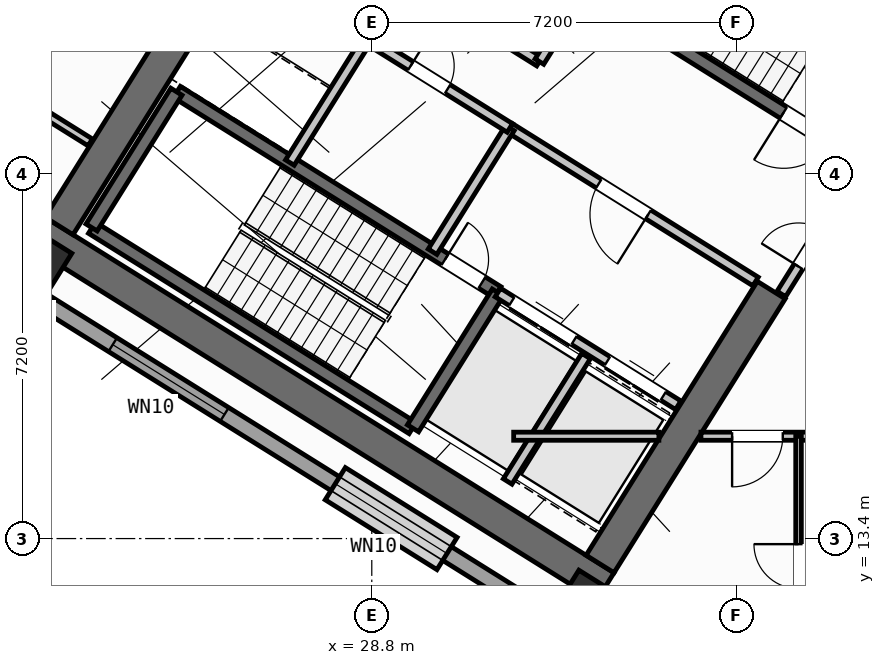
"""IFC4 building model, lengths in metres.
Left out: names, types, materials, properties, quantities, classifications, styles, units other than length and angle.
Written with IfcOpenShell. Run it as: python <this file> out.ifc"""

import sys

from ifc_helpers import new_model, si_unit, direction, frame, frame_2d, origin, origin_2d, place, context, subcontext, project, spatial, rectangle, hollow_rectangle, extrude, source, transform, mapped, element, fill, save


model = new_model("IFC4")
c1 = context("Model", 3, precision=1e-05, world=origin(), true_north=direction((0.0, 1.0)))
c2 = subcontext(c1, "Body", "Model", "MODEL_VIEW")
j1 = project(units=[si_unit("LENGTHUNIT", "METRE"), si_unit("PLANEANGLEUNIT", "RADIAN")], contexts=[c1])
p1 = place(None, origin())
s1 = spatial("IfcSite", under=j1, at=p1, CompositionType="ELEMENT")
p2 = place(p1, origin())
s2 = spatial("IfcBuilding", under=s1, at=p2, CompositionType="ELEMENT")
p3 = place(p2, frame((0.0, 0.0, 76.5)))
s3 = spatial("IfcBuildingStorey", under=s2, at=p3, CompositionType="ELEMENT", Elevation=76.5)
p4 = place(p3, frame((33.409, 12.45, 0.0), z_axis=(0.0, 0.0, 1.0), x_axis=(-0.848051132073, 0.529914405721, 0.0)))
e1 = element("IfcWall", 1, at=p4, inside=s3, PredefinedType="SHEAR", context=c2, shape_type="SweptSolid", body=[
    extrude(rectangle(XDim=13.24, YDim=0.65, at=frame_2d((6.62, 0.0))), origin(), (0.0, 0.0, 1.0), 4.25),
])
p5 = place(p3, frame((36.683, 18.304, 0.0), z_axis=(0.0, 0.0, 1.0), x_axis=(-0.529899109053, -0.848060690178, 0.0)))
e2 = element("IfcWall", 2, at=p5, inside=s3, PredefinedType="SHEAR", context=c2, shape_type="SweptSolid", body=[
    extrude(rectangle(XDim=6.375, YDim=0.65, at=frame_2d((3.188, 0.0))), origin(), (0.0, 0.0, 1.0), 4.25),
])
p6 = place(p3, frame((26.007, 24.976, 0.0), z_axis=(0.0, 0.0, 1.0), x_axis=(-0.529916319127, -0.848049936456, 0.0)))
e3 = element("IfcWall", 3, at=p6, inside=s3, PredefinedType="SHEAR", context=c2, shape_type="SweptSolid", body=[
    extrude(rectangle(XDim=6.375, YDim=0.65, at=frame_2d((3.188, 0.0))), origin(), (0.0, 0.0, 1.0), 4.25),
])
m1 = source(origin(), c2, "Body", "SweptSolid", [
    extrude(hollow_rectangle(XDim=1.0, YDim=1.0, WallThickness=0.04, at=origin_2d()), origin(), (0.0, 0.0, 1.0), 4.5),
])
for number, where, z_axis, x_axis in (
    (4, (33.046, 12.087, 0.0), (0.0, 0.0, 1.0), (-0.848, 0.53, 0.0)),
    (5, (22.191, 18.87, 0.0), (0.0, 0.0, 1.0), (-0.848, 0.53, 0.0)),
):
    element("IfcColumn", number, at=place(p3, frame(where, z_axis=z_axis, x_axis=x_axis)), inside=s3, PredefinedType="COLUMN", context=c2, shape_type="MappedRepresentation", body=[
        mapped(m1, transform((0.0, 0.0, 0.0), scale=1.0)),
    ])
p7 = place(p3, frame((31.76, 12.183, 0.0), z_axis=(0.0, 0.0, 1.0), x_axis=(-0.848047074256, 0.529920899612, 0.0)))
e6 = element("IfcWall", 6, at=p7, inside=s3, PredefinedType="STANDARD", context=c2, shape_type="SweptSolid", body=[
    extrude(rectangle(XDim=30.652, YDim=0.32, at=frame_2d((15.326, 0.0))), origin(), (0.0, 0.0, 1.0), 4.25),
])
p8 = place(p7, frame((14.878, 0.0, 0.0)))
e7 = element("IfcOpeningElement", 7, at=p8, cuts=e6, PredefinedType="OPENING", context=c2, shape_type="SweptSolid", body=[
    extrude(rectangle(XDim=1.2, YDim=2.15, at=frame_2d((0.6, 1.075))), frame((0.0, 0.17, 0.0), z_axis=(0.0, -1.0, 0.0), x_axis=(1.0, 0.0, 0.0)), (0.0, 0.0, 1.0), 0.34),
])
p9 = place(p7, frame((1.74, 0.0, 0.7)))
e8 = element("IfcOpeningElement", 8, at=p9, cuts=e6, PredefinedType="OPENING", context=c2, shape_type="SweptSolid", body=[
    extrude(rectangle(XDim=2.6, YDim=2.0, at=frame_2d((1.3, 1.0))), frame((0.0, 0.17, 0.0), z_axis=(0.0, -1.0, 0.0), x_axis=(1.0, 0.0, 0.0)), (0.0, 0.0, 1.0), 0.34),
])
p10 = place(p7, frame((6.919, 0.0, 0.7)))
e9 = element("IfcOpeningElement", 9, at=p10, cuts=e6, PredefinedType="OPENING", context=c2, shape_type="SweptSolid", body=[
    extrude(rectangle(XDim=2.6, YDim=2.0, at=frame_2d((1.3, 1.0))), frame((0.0, 0.17, 0.0), z_axis=(0.0, -1.0, 0.0), x_axis=(1.0, 0.0, 0.0)), (0.0, 0.0, 1.0), 0.34),
])
p11 = place(p7, frame((19.451, 0.0, 0.85)))
e10 = element("IfcOpeningElement", 10, at=p11, cuts=e6, PredefinedType="OPENING", context=c2, shape_type="SweptSolid", body=[
    extrude(rectangle(XDim=1.6, YDim=1.8, at=frame_2d((0.8, 0.9))), frame((0.0, 0.17, 0.0), z_axis=(0.0, -1.0, 0.0), x_axis=(1.0, 0.0, 0.0)), (0.0, 0.0, 1.0), 0.34),
])
p12 = place(p7, frame((26.358, 0.0, 0.7)))
e11 = element("IfcOpeningElement", 11, at=p12, cuts=e6, PredefinedType="OPENING", context=c2, shape_type="SweptSolid", body=[
    extrude(rectangle(XDim=2.6, YDim=2.0, at=frame_2d((1.3, 1.0))), frame((0.0, 0.17, 0.0), z_axis=(0.0, -1.0, 0.0), x_axis=(1.0, 0.0, 0.0)), (0.0, 0.0, 1.0), 0.34),
])
p13 = place(p3, frame((29.605, 15.581, 0.0), z_axis=(0.0, 0.0, 1.0), x_axis=(-0.848036911448, 0.529937163087, 0.0)))
e12 = element("IfcWall", 12, at=p13, inside=s3, PredefinedType="SHEAR", context=c2, shape_type="SweptSolid", body=[
    extrude(rectangle(XDim=7.46, YDim=0.26, at=frame_2d((3.73, 0.0))), origin(), (0.0, 0.0, 1.0), 4.25),
])
p14 = place(p3, frame((31.28, 18.261, 0.0), z_axis=(0.0, 0.0, 1.0), x_axis=(-0.848051618787, 0.529913626805, 0.0)))
e13 = element("IfcWall", 13, at=p14, inside=s3, PredefinedType="SHEAR", context=c2, shape_type="SweptSolid", body=[
    extrude(rectangle(XDim=7.46, YDim=0.26, at=frame_2d((3.73, 0.0))), origin(), (0.0, 0.0, 1.0), 4.25),
])
p15 = place(p14, frame((0.36, 0.0, 0.0)))
e14 = element("IfcOpeningElement", 14, at=p15, cuts=e13, PredefinedType="OPENING", context=c2, shape_type="SweptSolid", body=[
    extrude(rectangle(XDim=0.86, YDim=2.05, at=frame_2d((0.43, 1.025))), frame((0.0, 0.14, 0.0), z_axis=(0.0, -1.0, 0.0), x_axis=(1.0, 0.0, 0.0)), (0.0, 0.0, 1.0), 0.28),
])
p16 = place(p3, frame((31.288, 18.256, 0.0), z_axis=(0.0, 0.0, 1.0), x_axis=(-0.529943379326, -0.848033026897, 0.0)))
e15 = element("IfcWall", 15, at=p16, inside=s3, PredefinedType="SHEAR", context=c2, shape_type="SweptSolid", body=[
    extrude(rectangle(XDim=3.16, YDim=0.26, at=frame_2d((1.58, 0.0))), origin(), (0.0, 0.0, 1.0), 4.25),
])
p17 = place(p3, frame((24.945, 22.22, 0.0), z_axis=(0.0, 0.0, 1.0), x_axis=(-0.529908658664, -0.84805472316, 0.0)))
e16 = element("IfcWall", 16, at=p17, inside=s3, PredefinedType="SHEAR", context=c2, shape_type="SweptSolid", body=[
    extrude(rectangle(XDim=3.16, YDim=0.26, at=frame_2d((1.58, 0.0))), origin(), (0.0, 0.0, 1.0), 4.25),
])
p18 = place(p3, frame((38.046, 21.108, 0.0), z_axis=(0.0, 0.0, 1.0), x_axis=(-0.848054434086, 0.529909121291, 0.0)))
e17 = element("IfcWall", 17, at=p18, inside=s3, PredefinedType="SHEAR", context=c2, shape_type="SweptSolid", body=[
    extrude(rectangle(XDim=7.33, YDim=0.26, at=frame_2d((3.665, 0.0))), origin(), (0.0, 0.0, 1.0), 4.25),
])
p19 = place(p18, frame((0.22, 0.0, 0.0)))
e18 = element("IfcOpeningElement", 18, at=p19, cuts=e17, PredefinedType="OPENING", context=c2, shape_type="SweptSolid", body=[
    extrude(rectangle(XDim=1.1, YDim=2.1, at=frame_2d((0.55, 1.05))), frame((0.0, 0.14, 0.0), z_axis=(0.0, -1.0, 0.0), x_axis=(1.0, 0.0, 0.0)), (0.0, 0.0, 1.0), 0.28),
])
p20 = place(p3, frame((34.848, 16.031, 0.0), z_axis=(0.0, 0.0, 1.0), x_axis=(-0.848044042236, 0.529925751807, 0.0)))
e19 = element("IfcWall", 19, at=p20, inside=s3, PredefinedType="STANDARD", context=c2, shape_type="SweptSolid", body=[
    extrude(rectangle(XDim=4.198, YDim=0.2, at=frame_2d((2.099, 0.0))), origin(), (0.0, 0.0, 1.0), 4.24),
])
p21 = place(p20, frame((0.348, 0.0, 0.0)))
e20 = element("IfcOpeningElement", 20, at=p21, cuts=e19, PredefinedType="OPENING", context=c2, shape_type="SweptSolid", body=[
    extrude(rectangle(XDim=1.3, YDim=2.2, at=frame_2d((0.65, 1.1))), frame((0.0, 0.11, 0.0), z_axis=(0.0, -1.0, 0.0), x_axis=(1.0, 0.0, 0.0)), (0.0, 0.0, 1.0), 0.22),
])
p22 = place(p20, frame((2.423, 0.0, 0.0)))
e21 = element("IfcOpeningElement", 21, at=p22, cuts=e19, PredefinedType="OPENING", context=c2, shape_type="SweptSolid", body=[
    extrude(rectangle(XDim=1.45, YDim=2.25, at=frame_2d((0.725, 1.125))), frame((0.0, 0.11, 0.0), z_axis=(0.0, -1.0, 0.0), x_axis=(1.0, 0.0, 0.0)), (0.0, 0.0, 1.0), 0.22),
])
p23 = place(p3, frame((36.374, 18.474, 0.0), z_axis=(0.0, 0.0, 1.0), x_axis=(-0.848051071577, 0.529914502535, 0.0)))
e22 = element("IfcWall", 22, at=p23, inside=s3, PredefinedType="STANDARD", context=c2, shape_type="SweptSolid", body=[
    extrude(rectangle(XDim=5.718, YDim=0.2, at=frame_2d((2.859, 0.0))), origin(), (0.0, 0.0, 1.0), 4.24),
])
p24 = place(p23, frame((2.498, 0.0, 0.0)))
e23 = element("IfcOpeningElement", 23, at=p24, cuts=e22, PredefinedType="OPENING", context=c2, shape_type="SweptSolid", body=[
    extrude(rectangle(XDim=1.15, YDim=2.1, at=frame_2d((0.575, 1.05))), frame((0.0, 0.11, 0.0), z_axis=(0.0, -1.0, 0.0), x_axis=(1.0, 0.0, 0.0)), (0.0, 0.0, 1.0), 0.22),
])
p25 = place(p3, frame((32.108, 22.814, 0.0), z_axis=(0.0, 0.0, 1.0), x_axis=(-0.848042229521, 0.529928652696, 0.0)))
e24 = element("IfcWall", 24, at=p25, inside=s3, PredefinedType="STANDARD", context=c2, shape_type="SweptSolid", body=[
    extrude(rectangle(XDim=5.62, YDim=0.2, at=frame_2d((2.81, 0.0))), origin(), (0.0, 0.0, 1.0), 4.24),
])
p26 = place(p3, frame((32.982, 24.213, 0.0), z_axis=(0.0, 0.0, 1.0), x_axis=(-0.529839334948, -0.84809803628, 0.0)))
e25 = element("IfcWall", 25, at=p26, inside=s3, PredefinedType="STANDARD", context=c2, shape_type="SweptSolid", body=[
    extrude(rectangle(XDim=1.65, YDim=0.2, at=frame_2d((0.825, 0.0))), origin(), (0.0, 0.0, 1.0), 4.24),
])
p27 = place(p3, frame((33.029, 17.003, 0.0), z_axis=(0.0, 0.0, 1.0), x_axis=(-0.529916267533, -0.848049968695, 0.0)))
e26 = element("IfcWall", 26, at=p27, inside=s3, PredefinedType="STANDARD", context=c2, shape_type="SweptSolid", body=[
    extrude(rectangle(XDim=2.92, YDim=0.2, at=frame_2d((1.46, 0.0))), origin(), (0.0, 0.0, 1.0), 4.24),
])
for number, where, z_axis, x_axis in (
    (27, (31.525, 21.504, 0.0), (0.0, 0.0, 1.0), (-0.53, -0.848, 0.0)),
    (28, (28.71, 23.263, 0.0), (0.0, 0.0, 1.0), (-0.53, -0.848, 0.0)),
):
    element("IfcWall", number, at=place(p3, frame(where, z_axis=z_axis, x_axis=x_axis)), inside=s3, PredefinedType="STANDARD", context=c2, shape_type="SweptSolid", body=[
        extrude(rectangle(XDim=2.88, YDim=0.2, at=frame_2d((1.44, 0.0))), origin(), (0.0, 0.0, 1.0), 4.24),
    ])
p28 = place(p3, frame((31.525, 21.504, 0.0), z_axis=(0.0, 0.0, 1.0), x_axis=(-0.848044998614, 0.529924221305, 0.0)))
e29 = element("IfcWall", 29, at=p28, inside=s3, PredefinedType="STANDARD", context=c2, shape_type="SweptSolid", body=[
    extrude(rectangle(XDim=6.168, YDim=0.2, at=frame_2d((3.084, 0.0))), origin(), (0.0, 0.0, 1.0), 4.24),
])
p29 = place(p28, frame((4.4, 0.0, 0.0)))
e30 = element("IfcOpeningElement", 30, at=p29, cuts=e29, PredefinedType="OPENING", context=c2, shape_type="SweptSolid", body=[
    extrude(rectangle(XDim=0.86, YDim=2.05, at=frame_2d((0.43, 1.025))), frame((0.0, 0.11, 0.0), z_axis=(0.0, -1.0, 0.0), x_axis=(1.0, 0.0, 0.0)), (0.0, 0.0, 1.0), 0.22),
])
p30 = place(p28, frame((1.45, 0.0, 0.0)))
e31 = element("IfcOpeningElement", 31, at=p30, cuts=e29, PredefinedType="OPENING", context=c2, shape_type="SweptSolid", body=[
    extrude(rectangle(XDim=0.86, YDim=2.05, at=frame_2d((0.43, 1.025))), frame((0.0, 0.11, 0.0), z_axis=(0.0, -1.0, 0.0), x_axis=(1.0, 0.0, 0.0)), (0.0, 0.0, 1.0), 0.22),
])
p31 = place(p3, frame((23.244, 21.219, 0.0), z_axis=(0.0, 0.0, 1.0), x_axis=(-0.848040823168, 0.52993090327, 0.0)))
e32 = element("IfcWall", 32, at=p31, inside=s3, PredefinedType="PARTITIONING", context=c2, shape_type="SweptSolid", body=[
    extrude(rectangle(XDim=2.258, YDim=0.16, at=frame_2d((1.129, 0.0))), origin(), (0.0, 0.0, 1.0), 4.24),
])
p32 = place(p3, frame((38.451, 20.737, 0.0), z_axis=(0.0, 0.0, 1.0), x_axis=(-0.529924799939, -0.848044637038, 0.0)))
e33 = element("IfcWall", 33, at=p32, inside=s3, PredefinedType="STANDARD", context=c2, shape_type="SweptSolid", body=[
    extrude(rectangle(XDim=2.96, YDim=0.2, at=frame_2d((1.48, 0.0))), origin(), (0.0, 0.0, 1.0), 4.24),
])
p33 = place(p32, frame((1.46, 0.0, 0.0)))
e34 = element("IfcOpeningElement", 34, at=p33, cuts=e33, PredefinedType="OPENING", context=c2, shape_type="SweptSolid", body=[
    extrude(rectangle(XDim=0.86, YDim=2.05, at=frame_2d((0.43, 1.025))), frame((0.0, 0.11, 0.0), z_axis=(0.0, -1.0, 0.0), x_axis=(1.0, 0.0, 0.0)), (0.0, 0.0, 1.0), 0.22),
])
p34 = place(p3, frame((31.6, 15.42, 0.0), z_axis=(0.0, 0.0, 1.0), x_axis=(1.0, 0.0, 0.0)))
e35 = element("IfcWall", 35, at=p34, inside=s3, PredefinedType="PARTITIONING", context=c2, shape_type="SweptSolid", body=[
    extrude(rectangle(XDim=2.866, YDim=0.16, at=frame_2d((1.433, 0.0))), origin(), (0.0, 0.0, 1.0), 4.24),
])
p35 = place(p3, frame((35.296, 15.42, 0.0), z_axis=(0.0, 0.0, 1.0), x_axis=(1.0, 0.0, 0.0)))
e36 = element("IfcWall", 36, at=p35, inside=s3, PredefinedType="PARTITIONING", context=c2, shape_type="SweptSolid", body=[
    extrude(rectangle(XDim=15.311, YDim=0.16, at=frame_2d((7.655, 0.0))), origin(), (0.0, 0.0, 1.0), 4.24),
])
p36 = place(p35, frame((0.615, 0.0, 0.0)))
e37 = element("IfcOpeningElement", 37, at=p36, cuts=e36, PredefinedType="OPENING", context=c2, shape_type="SweptSolid", body=[
    extrude(rectangle(XDim=1.0, YDim=2.1, at=frame_2d((0.5, 1.05))), frame((0.0, 0.09, 0.0), z_axis=(0.0, -1.0, 0.0), x_axis=(1.0, 0.0, 0.0)), (0.0, 0.0, 1.0), 0.18),
])
p37 = place(p35, frame((9.035, 0.0, 0.0)))
e38 = element("IfcOpeningElement", 38, at=p37, cuts=e36, PredefinedType="OPENING", context=c2, shape_type="SweptSolid", body=[
    extrude(rectangle(XDim=1.0, YDim=2.1, at=frame_2d((0.5, 1.05))), frame((0.0, 0.09, 0.0), z_axis=(0.0, -1.0, 0.0), x_axis=(1.0, 0.0, 0.0)), (0.0, 0.0, 1.0), 0.18),
])
p38 = place(p3, frame((37.222, 1.96, 0.0), z_axis=(0.0, 0.0, 1.0), x_axis=(0.0, 1.0, 0.0)))
e39 = element("IfcWall", 39, at=p38, inside=s3, PredefinedType="PARTITIONING", context=c2, shape_type="SweptSolid", body=[
    extrude(rectangle(XDim=13.46, YDim=0.11, at=frame_2d((6.73, 0.0))), origin(), (0.0, 0.0, 1.0), 4.24),
])
p39 = place(p38, frame((5.2, 0.0, 0.0)))
e40 = element("IfcOpeningElement", 40, at=p39, cuts=e39, PredefinedType="OPENING", context=c2, shape_type="SweptSolid", body=[
    extrude(rectangle(XDim=0.92, YDim=2.08, at=frame_2d((0.46, 1.04))), frame((0.0, 0.065, 0.0), z_axis=(0.0, -1.0, 0.0), x_axis=(1.0, 0.0, 0.0)), (0.0, 0.0, 1.0), 0.13),
])
p40 = place(p38, frame((10.45, 0.0, 0.0)))
e41 = element("IfcOpeningElement", 41, at=p40, cuts=e39, PredefinedType="OPENING", context=c2, shape_type="SweptSolid", body=[
    extrude(rectangle(XDim=0.88, YDim=2.08, at=frame_2d((0.44, 1.04))), frame((0.0, 0.065, 0.0), z_axis=(0.0, -1.0, 0.0), x_axis=(1.0, 0.0, 0.0)), (0.0, 0.0, 1.0), 0.13),
])
m2 = source(origin(), c2, "Body", "SweptSolid", [
    extrude(rectangle(XDim=2.6, YDim=2.0, at=frame_2d((1.3, 1.0))), frame((0.0, 0.03, 0.0), z_axis=(0.0, -1.0, 0.0), x_axis=(1.0, 0.0, 0.0)), (0.0, 0.0, 1.0), 0.06),
])
p41 = place(p9, origin())
e42 = element("IfcWindow", 42, at=p41, inside=s3, PartitioningType="SINGLE_PANEL", PredefinedType="WINDOW", context=c2, shape_type="MappedRepresentation", body=[
    mapped(m2, transform((0.0, 0.0, 0.0), scale=1.0)),
])
fill(e8, e42)
p42 = place(p10, origin())
e43 = element("IfcWindow", 43, at=p42, inside=s3, PartitioningType="SINGLE_PANEL", PredefinedType="WINDOW", context=c2, shape_type="MappedRepresentation", body=[
    mapped(m2, transform((0.0, 0.0, 0.0), scale=1.0)),
])
fill(e9, e43)
m3 = source(origin(), c2, "Body", "SweptSolid", [
    extrude(rectangle(XDim=0.86, YDim=2.05, at=frame_2d((0.43, 1.025))), frame((0.0, 0.025, 0.0), z_axis=(0.0, -1.0, 0.0), x_axis=(1.0, 0.0, 0.0)), (0.0, 0.0, 1.0), 0.05),
])
p43 = place(p15, frame((0.86, 0.0, 0.0), z_axis=(0.0, 0.0, 1.0), x_axis=(-1.0, 0.0, 0.0)))
e44 = element("IfcDoor", 44, at=p43, inside=s3, OperationType="SINGLE_SWING_LEFT", PredefinedType="DOOR", context=c2, shape_type="MappedRepresentation", body=[
    mapped(m3, transform((0.0, 0.0, 0.0), scale=1.0)),
])
fill(e14, e44)
m4 = source(origin(), c2, "Body", "SweptSolid", [
    extrude(rectangle(XDim=1.1, YDim=2.1, at=frame_2d((0.55, 1.05))), frame((0.0, 0.025, 0.0), z_axis=(0.0, -1.0, 0.0), x_axis=(1.0, 0.0, 0.0)), (0.0, 0.0, 1.0), 0.05),
])
p44 = place(p19, origin())
e45 = element("IfcDoor", 45, at=p44, inside=s3, OperationType="SINGLE_SWING_RIGHT", PredefinedType="DOOR", context=c2, shape_type="MappedRepresentation", body=[
    mapped(m4, transform((0.0, 0.0, 0.0), scale=1.0)),
])
fill(e18, e45)
m5 = source(origin(), c2, "Body", "SweptSolid", [
    extrude(rectangle(XDim=1.15, YDim=2.1, at=frame_2d((0.575, 1.05))), frame((0.0, 0.025, 0.0), z_axis=(0.0, -1.0, 0.0), x_axis=(1.0, 0.0, 0.0)), (0.0, 0.0, 1.0), 0.05),
])
p45 = place(p24, origin())
e46 = element("IfcDoor", 46, at=p45, inside=s3, OperationType="SINGLE_SWING_LEFT", PredefinedType="DOOR", context=c2, shape_type="MappedRepresentation", body=[
    mapped(m5, transform((0.0, 0.0, 0.0), scale=1.0)),
])
fill(e23, e46)
m6 = source(origin(), c2, "Body", "SweptSolid", [
    extrude(rectangle(XDim=1.3, YDim=2.2, at=frame_2d((0.65, 1.1))), frame((0.0, 0.025, 0.0), z_axis=(0.0, -1.0, 0.0), x_axis=(1.0, 0.0, 0.0)), (0.0, 0.0, 1.0), 0.05),
])
p46 = place(p21, origin())
e47 = element("IfcDoor", 47, at=p46, inside=s3, OperationType="DOUBLE_DOOR_SLIDING", PredefinedType="DOOR", context=c2, shape_type="MappedRepresentation", body=[
    mapped(m6, transform((0.0, 0.0, 0.0), scale=1.0)),
])
fill(e20, e47)
m7 = source(origin(), c2, "Body", "SweptSolid", [
    extrude(rectangle(XDim=1.45, YDim=2.25, at=frame_2d((0.725, 1.125))), frame((0.0, 0.025, 0.0), z_axis=(0.0, -1.0, 0.0), x_axis=(1.0, 0.0, 0.0)), (0.0, 0.0, 1.0), 0.05),
])
p47 = place(p22, origin())
e48 = element("IfcDoor", 48, at=p47, inside=s3, OperationType="DOUBLE_DOOR_SLIDING", PredefinedType="DOOR", context=c2, shape_type="MappedRepresentation", body=[
    mapped(m7, transform((0.0, 0.0, 0.0), scale=1.0)),
])
fill(e21, e48)
p48 = place(p30, frame((0.86, 0.0, 0.0), z_axis=(0.0, 0.0, 1.0), x_axis=(-1.0, 0.0, 0.0)))
e49 = element("IfcDoor", 49, at=p48, inside=s3, OperationType="SINGLE_SWING_LEFT", PredefinedType="DOOR", context=c2, shape_type="MappedRepresentation", body=[
    mapped(m3, transform((0.0, 0.0, 0.0), scale=1.0)),
])
fill(e31, e49)
p49 = place(p33, frame((0.86, 0.0, 0.0), z_axis=(0.0, 0.0, 1.0), x_axis=(-1.0, 0.0, 0.0)))
e50 = element("IfcDoor", 50, at=p49, inside=s3, OperationType="SINGLE_SWING_LEFT", PredefinedType="DOOR", context=c2, shape_type="MappedRepresentation", body=[
    mapped(m3, transform((0.0, 0.0, 0.0), scale=1.0)),
])
fill(e34, e50)
m8 = source(origin(), c2, "Body", "SweptSolid", [
    extrude(rectangle(XDim=1.0, YDim=2.1, at=frame_2d((0.5, 1.05))), frame((0.0, 0.025, 0.0), z_axis=(0.0, -1.0, 0.0), x_axis=(1.0, 0.0, 0.0)), (0.0, 0.0, 1.0), 0.05),
])
p50 = place(p36, frame((1.0, 0.0, 0.0), z_axis=(0.0, 0.0, 1.0), x_axis=(-1.0, 0.0, 0.0)))
e51 = element("IfcDoor", 51, at=p50, inside=s3, OperationType="SINGLE_SWING_RIGHT", PredefinedType="DOOR", context=c2, shape_type="MappedRepresentation", body=[
    mapped(m8, transform((0.0, 0.0, 0.0), scale=1.0)),
])
fill(e37, e51)
m9 = source(origin(), c2, "Body", "SweptSolid", [
    extrude(rectangle(XDim=0.88, YDim=2.08, at=frame_2d((0.44, 1.04))), frame((0.0, 0.025, 0.0), z_axis=(0.0, -1.0, 0.0), x_axis=(1.0, 0.0, 0.0)), (0.0, 0.0, 1.0), 0.05),
])
p51 = place(p40, origin())
e52 = element("IfcDoor", 52, at=p51, inside=s3, OperationType="SINGLE_SWING_RIGHT", PredefinedType="DOOR", context=c2, shape_type="MappedRepresentation", body=[
    mapped(m9, transform((0.0, 0.0, 0.0), scale=1.0)),
])
fill(e41, e52)
save(model, sys.argv[1])
